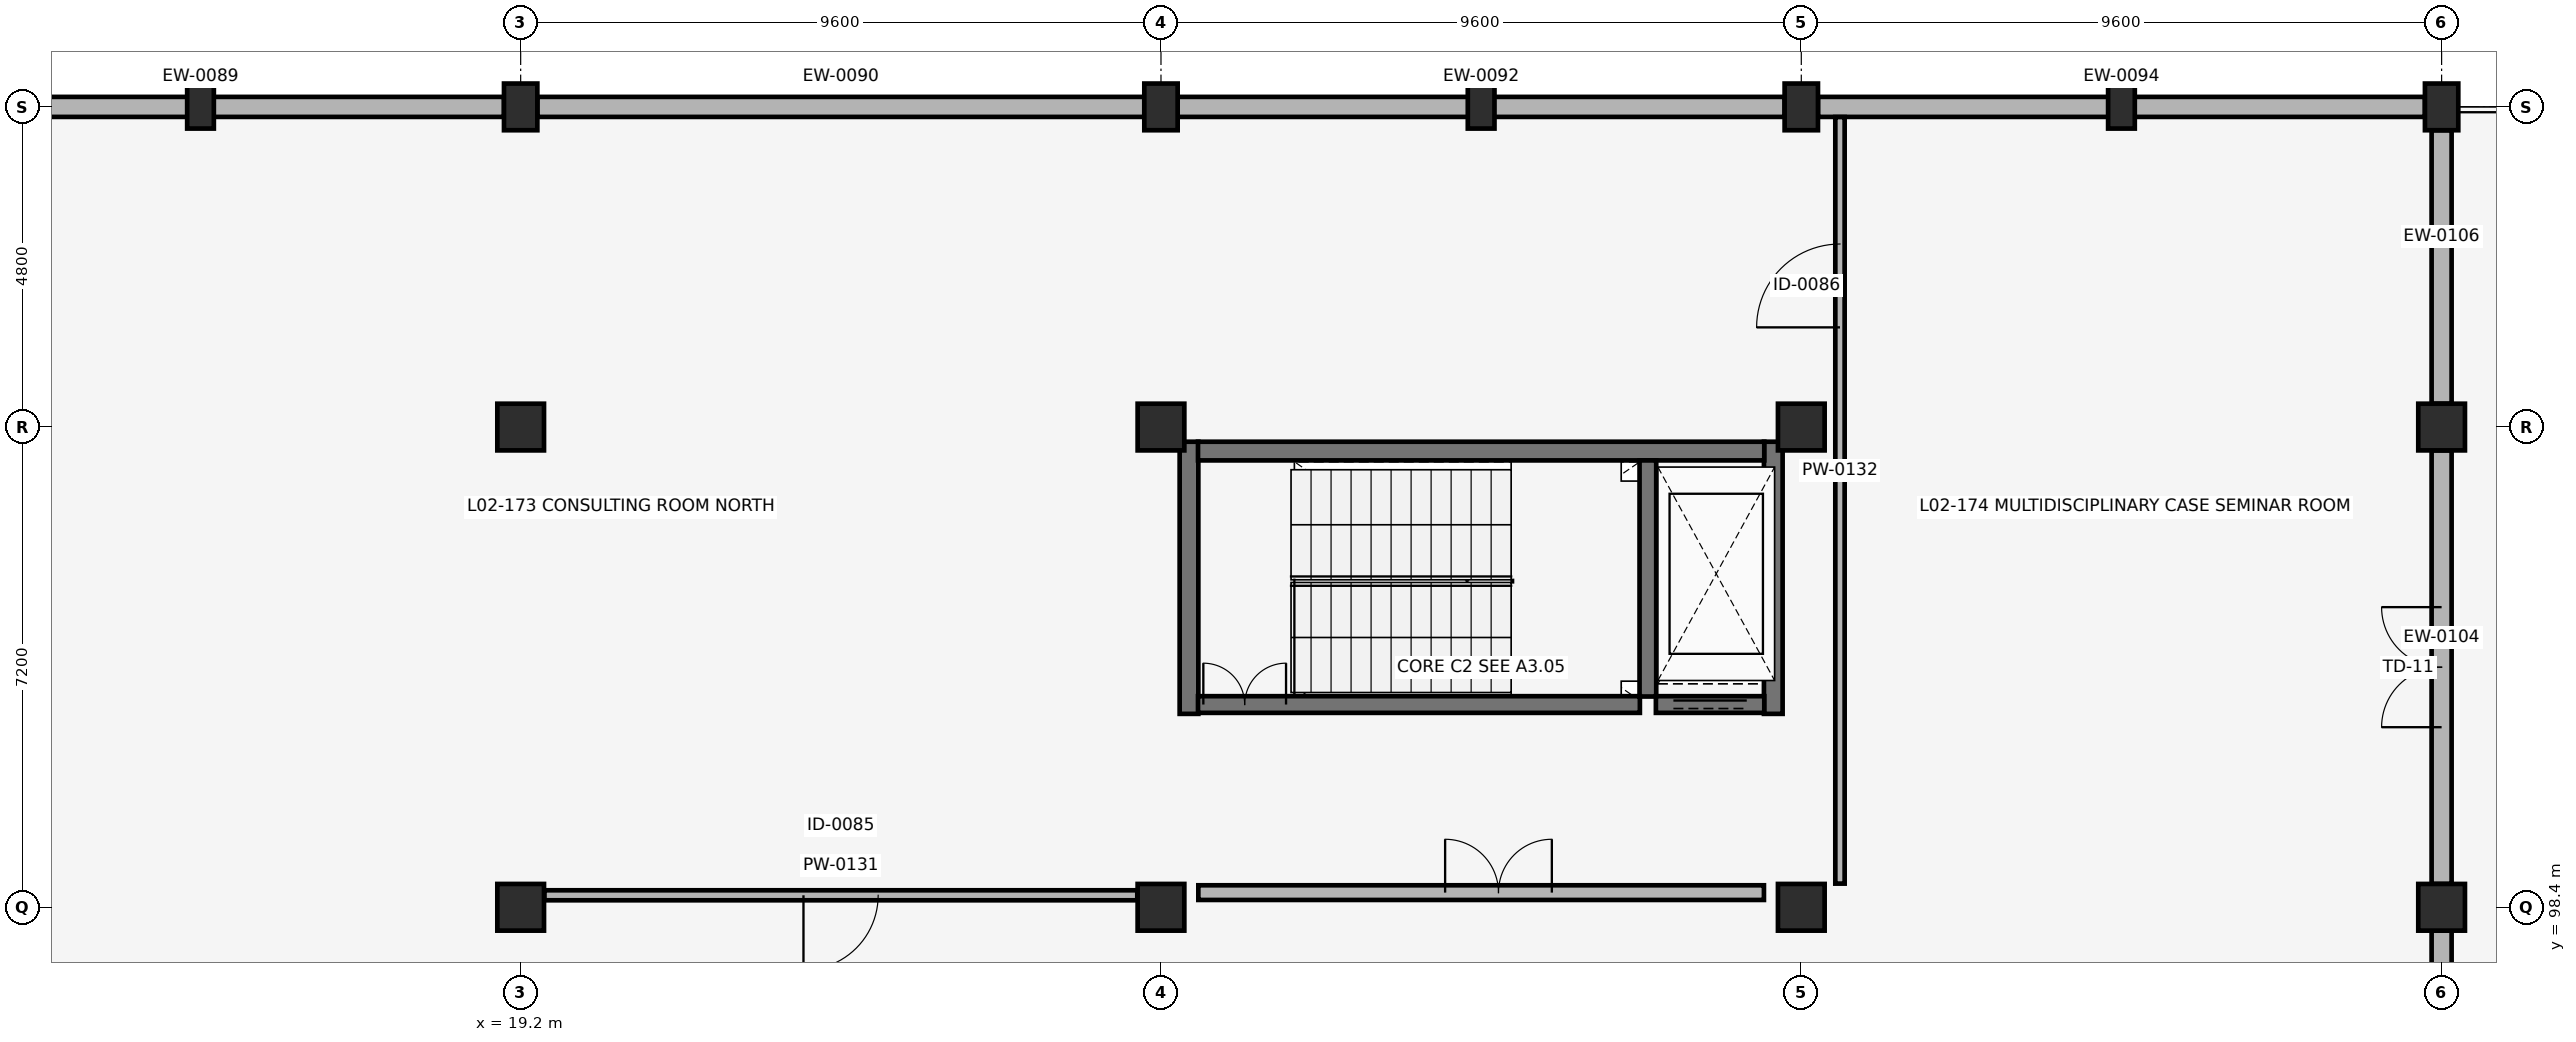
"""IFC4 building model, lengths in metres.
Left out: names, types, materials, properties, quantities, classifications, styles, units other than length and angle.
Written with IfcOpenShell. Run it as: python <this file> out.ifc"""

import sys

from ifc_helpers import new_model, si_unit, direction, frame, frame_2d, origin, origin_2d, place, context, subcontext, project, spatial, rectangle, extrude, element, fill, save


model = new_model("IFC4")
c1 = context("Model", 3, precision=1e-05, world=origin(), true_north=direction((0.0, 1.0)))
c2 = subcontext(c1, "Body", "Model", "MODEL_VIEW")
j1 = project(units=[si_unit("LENGTHUNIT", "METRE"), si_unit("PLANEANGLEUNIT", "RADIAN")], contexts=[c1])
p1 = place(None, origin())
s1 = spatial("IfcSite", under=j1, at=p1, CompositionType="ELEMENT")
p2 = place(p1, origin())
s2 = spatial("IfcBuilding", under=s1, at=p2, CompositionType="ELEMENT")
p3 = place(p2, frame((0.0, 0.0, 8.5)))
s3 = spatial("IfcBuildingStorey", under=s2, at=p3, CompositionType="ELEMENT", Elevation=8.5)
for number, where, z_axis, x_axis in (
    (1, (19.2, 98.4, 0.0), (0.0, 0.0, 1.0), (1.0, 0.0, 0.0)),
    (2, (19.2, 105.6, 0.0), (0.0, 0.0, 1.0), (1.0, 0.0, 0.0)),
):
    element("IfcColumn", number, at=place(p3, frame(where, z_axis=z_axis, x_axis=x_axis)), inside=s3, PredefinedType="COLUMN", context=c2, shape_type="SweptSolid", body=[
        extrude(rectangle(XDim=0.7, YDim=0.7, at=origin_2d()), origin(), (0.0, 0.0, 1.0), 4.08),
    ])
p4 = place(p3, frame((19.2, 110.4, 0.0), z_axis=(0.0, 0.0, 1.0), x_axis=(1.0, 0.0, 0.0)))
e3 = element("IfcColumn", 3, at=p4, inside=s3, PredefinedType="COLUMN", context=c2, shape_type="SweptSolid", body=[
    extrude(rectangle(XDim=0.5, YDim=0.7, at=origin_2d()), origin(), (0.0, 0.0, 1.0), 4.08),
])
for number, where, z_axis, x_axis in (
    (4, (28.8, 98.4, 0.0), (0.0, 0.0, 1.0), (1.0, 0.0, 0.0)),
    (5, (28.8, 105.6, 0.0), (0.0, 0.0, 1.0), (1.0, 0.0, 0.0)),
):
    element("IfcColumn", number, at=place(p3, frame(where, z_axis=z_axis, x_axis=x_axis)), inside=s3, PredefinedType="COLUMN", context=c2, shape_type="SweptSolid", body=[
        extrude(rectangle(XDim=0.7, YDim=0.7, at=origin_2d()), origin(), (0.0, 0.0, 1.0), 4.08),
    ])
p5 = place(p3, frame((28.8, 110.4, 0.0), z_axis=(0.0, 0.0, 1.0), x_axis=(1.0, 0.0, 0.0)))
e6 = element("IfcColumn", 6, at=p5, inside=s3, PredefinedType="COLUMN", context=c2, shape_type="SweptSolid", body=[
    extrude(rectangle(XDim=0.5, YDim=0.7, at=origin_2d()), origin(), (0.0, 0.0, 1.0), 4.08),
])
for number, where, z_axis, x_axis in (
    (7, (38.4, 98.4, 0.0), (0.0, 0.0, 1.0), (1.0, 0.0, 0.0)),
    (8, (38.4, 105.6, 0.0), (0.0, 0.0, 1.0), (1.0, 0.0, 0.0)),
):
    element("IfcColumn", number, at=place(p3, frame(where, z_axis=z_axis, x_axis=x_axis)), inside=s3, PredefinedType="COLUMN", context=c2, shape_type="SweptSolid", body=[
        extrude(rectangle(XDim=0.7, YDim=0.7, at=origin_2d()), origin(), (0.0, 0.0, 1.0), 4.08),
    ])
p6 = place(p3, frame((38.4, 110.4, 0.0), z_axis=(0.0, 0.0, 1.0), x_axis=(1.0, 0.0, 0.0)))
e9 = element("IfcColumn", 9, at=p6, inside=s3, PredefinedType="COLUMN", context=c2, shape_type="SweptSolid", body=[
    extrude(rectangle(XDim=0.5, YDim=0.7, at=origin_2d()), origin(), (0.0, 0.0, 1.0), 4.08),
])
for number, where, z_axis, x_axis in (
    (10, (48.0, 98.4, 0.0), (0.0, 0.0, 1.0), (1.0, 0.0, 0.0)),
    (11, (48.0, 105.6, 0.0), (0.0, 0.0, 1.0), (1.0, 0.0, 0.0)),
):
    element("IfcColumn", number, at=place(p3, frame(where, z_axis=z_axis, x_axis=x_axis)), inside=s3, PredefinedType="COLUMN", context=c2, shape_type="SweptSolid", body=[
        extrude(rectangle(XDim=0.7, YDim=0.7, at=origin_2d()), origin(), (0.0, 0.0, 1.0), 4.08),
    ])
p7 = place(p3, frame((48.0, 110.4, 0.0), z_axis=(0.0, 0.0, 1.0), x_axis=(1.0, 0.0, 0.0)))
e12 = element("IfcColumn", 12, at=p7, inside=s3, PredefinedType="COLUMN", context=c2, shape_type="SweptSolid", body=[
    extrude(rectangle(XDim=0.5, YDim=0.7, at=origin_2d()), origin(), (0.0, 0.0, 1.0), 4.08),
])
for number, where, z_axis, x_axis in (
    (13, (14.4, 110.4, 0.0), (0.0, 0.0, 1.0), (1.0, 0.0, 0.0)),
    (14, (33.6, 110.4, 0.0), (0.0, 0.0, 1.0), (1.0, 0.0, 0.0)),
    (15, (43.2, 110.4, 0.0), (0.0, 0.0, 1.0), (1.0, 0.0, 0.0)),
):
    element("IfcColumn", number, at=place(p3, frame(where, z_axis=z_axis, x_axis=x_axis)), inside=s3, PredefinedType="PILASTER", context=c2, shape_type="SweptSolid", body=[
        extrude(rectangle(XDim=0.4, YDim=0.65, at=origin_2d()), origin(), (0.0, 0.0, 1.0), 4.08),
    ])
p8 = place(p3, frame((18.95, 110.4, 0.0), z_axis=(0.0, 0.0, 1.0), x_axis=(-1.0, 0.0, 0.0)))
e16 = element("IfcWall", 16, at=p8, inside=s3, PredefinedType="SOLIDWALL", context=c2, shape_type="SweptSolid", body=[
    extrude(rectangle(XDim=9.1, YDim=0.3, at=frame_2d((4.55, 0.0))), origin(), (0.0, 0.0, 1.0), 3.08),
])
p9 = place(p3, frame((28.55, 110.4, 0.0), z_axis=(0.0, 0.0, 1.0), x_axis=(-1.0, 0.0, 0.0)))
e17 = element("IfcWall", 17, at=p9, inside=s3, PredefinedType="SOLIDWALL", context=c2, shape_type="SweptSolid", body=[
    extrude(rectangle(XDim=9.1, YDim=0.3, at=frame_2d((4.55, 0.0))), origin(), (0.0, 0.0, 1.0), 3.08),
])
p10 = place(p3, frame((38.15, 110.4, 0.0), z_axis=(0.0, 0.0, 1.0), x_axis=(-1.0, 0.0, 0.0)))
e18 = element("IfcWall", 18, at=p10, inside=s3, PredefinedType="SOLIDWALL", context=c2, shape_type="SweptSolid", body=[
    extrude(rectangle(XDim=9.1, YDim=0.3, at=frame_2d((4.55, 0.0))), origin(), (0.0, 0.0, 1.0), 3.08),
])
p11 = place(p3, frame((47.75, 110.4, 0.0), z_axis=(0.0, 0.0, 1.0), x_axis=(-1.0, 0.0, 0.0)))
e19 = element("IfcWall", 19, at=p11, inside=s3, PredefinedType="SOLIDWALL", context=c2, shape_type="SweptSolid", body=[
    extrude(rectangle(XDim=9.1, YDim=0.3, at=frame_2d((4.55, 0.0))), origin(), (0.0, 0.0, 1.0), 3.08),
])
p12 = place(p3, frame((48.0, 91.55, 0.0), z_axis=(0.0, 0.0, 1.0), x_axis=(0.0, 1.0, 0.0)))
e20 = element("IfcWall", 20, at=p12, inside=s3, PredefinedType="SOLIDWALL", context=c2, shape_type="SweptSolid", body=[
    extrude(rectangle(XDim=6.5, YDim=0.3, at=frame_2d((3.25, 0.0))), origin(), (0.0, 0.0, 1.0), 3.08),
])
p13 = place(p3, frame((48.0, 98.75, 0.0), z_axis=(0.0, 0.0, 1.0), x_axis=(0.0, 1.0, 0.0)))
e21 = element("IfcWall", 21, at=p13, inside=s3, PredefinedType="SOLIDWALL", context=c2, shape_type="SweptSolid", body=[
    extrude(rectangle(XDim=6.5, YDim=0.3, at=frame_2d((3.25, 0.0))), origin(), (0.0, 0.0, 1.0), 3.08),
])
p14 = place(p13, frame((2.35, 0.0, 0.0)))
e22 = element("IfcOpeningElement", 22, at=p14, cuts=e21, PredefinedType="OPENING", context=c2, shape_type="SweptSolid", body=[
    extrude(rectangle(XDim=1.8, YDim=2.2, at=frame_2d((0.9, 1.1))), frame((0.0, 0.16, 0.0), z_axis=(0.0, -1.0, 0.0), x_axis=(1.0, 0.0, 0.0)), (0.0, 0.0, 1.0), 0.32),
])
p15 = place(p3, frame((48.0, 105.95, 0.0), z_axis=(0.0, 0.0, 1.0), x_axis=(0.0, 1.0, 0.0)))
e23 = element("IfcWall", 23, at=p15, inside=s3, PredefinedType="SOLIDWALL", context=c2, shape_type="SweptSolid", body=[
    extrude(rectangle(XDim=4.1, YDim=0.3, at=frame_2d((2.05, 0.0))), origin(), (0.0, 0.0, 1.0), 3.08),
])
for number, where, z_axis, x_axis in (
    (24, (29.22, 101.3, 0.0), (0.0, 0.0, 1.0), (0.0, 1.0, 0.0)),
    (25, (37.98, 101.3, 0.0), (0.0, 0.0, 1.0), (0.0, 1.0, 0.0)),
):
    element("IfcWall", number, at=place(p3, frame(where, z_axis=z_axis, x_axis=x_axis)), inside=s3, PredefinedType="SHEAR", context=c2, shape_type="SweptSolid", body=[
        extrude(rectangle(XDim=4.08, YDim=0.28, at=frame_2d((2.04, 0.0))), origin(), (0.0, 0.0, 1.0), 3.8),
    ])
p16 = place(p3, frame((29.355, 105.24, 0.0), z_axis=(0.0, 0.0, 1.0), x_axis=(1.0, 0.0, 0.0)))
e26 = element("IfcWall", 26, at=p16, inside=s3, PredefinedType="SHEAR", context=c2, shape_type="SweptSolid", body=[
    extrude(rectangle(XDim=8.49, YDim=0.28, at=frame_2d((4.245, 0.0))), origin(), (0.0, 0.0, 1.0), 3.8),
])
p17 = place(p3, frame((36.1, 101.56, 0.0), z_axis=(0.0, 0.0, 1.0), x_axis=(0.0, 1.0, 0.0)))
e27 = element("IfcWall", 27, at=p17, inside=s3, PredefinedType="SHEAR", context=c2, shape_type="SweptSolid", body=[
    extrude(rectangle(XDim=3.54, YDim=0.25, at=frame_2d((1.77, 0.0))), origin(), (0.0, 0.0, 1.0), 3.8),
])
p18 = place(p3, frame((29.355, 101.44, 0.0), z_axis=(0.0, 0.0, 1.0), x_axis=(1.0, 0.0, 0.0)))
e28 = element("IfcWall", 28, at=p18, inside=s3, PredefinedType="SHEAR", context=c2, shape_type="SweptSolid", body=[
    extrude(rectangle(XDim=6.625, YDim=0.25, at=frame_2d((3.312, 0.0))), origin(), (0.0, 0.0, 1.0), 3.8),
])
p19 = place(p18, frame((0.08, 0.0, 0.0)))
e29 = element("IfcOpeningElement", 29, at=p19, cuts=e28, PredefinedType="OPENING", context=c2, shape_type="SweptSolid", body=[
    extrude(rectangle(XDim=1.24, YDim=2.15, at=frame_2d((0.62, 1.075))), frame((0.0, 0.135, 0.0), z_axis=(0.0, -1.0, 0.0), x_axis=(1.0, 0.0, 0.0)), (0.0, 0.0, 1.0), 0.27),
])
p20 = place(p3, frame((29.36, 98.62, 0.0), z_axis=(0.0, 0.0, 1.0), x_axis=(1.0, 0.0, 0.0)))
e30 = element("IfcWall", 30, at=p20, inside=s3, PredefinedType="PARTITIONING", context=c2, shape_type="SweptSolid", body=[
    extrude(rectangle(XDim=8.48, YDim=0.22, at=frame_2d((4.24, 0.0))), origin(), (0.0, 0.0, 1.0), 3.13),
])
p21 = place(p20, frame((3.7, 0.0, 0.0)))
e31 = element("IfcOpeningElement", 31, at=p21, cuts=e30, PredefinedType="OPENING", context=c2, shape_type="SweptSolid", body=[
    extrude(rectangle(XDim=1.6, YDim=2.2, at=frame_2d((0.8, 1.1))), frame((0.0, 0.12, 0.0), z_axis=(0.0, -1.0, 0.0), x_axis=(1.0, 0.0, 0.0)), (0.0, 0.0, 1.0), 0.24),
])
p22 = place(p3, frame((36.22, 101.44, 0.0), z_axis=(0.0, 0.0, 1.0), x_axis=(1.0, 0.0, 0.0)))
e32 = element("IfcWall", 32, at=p22, inside=s3, PredefinedType="SHEAR", context=c2, shape_type="SweptSolid", body=[
    extrude(rectangle(XDim=1.625, YDim=0.25, at=frame_2d((0.812, 0.0))), origin(), (0.0, 0.0, 1.0), 3.8),
])
p23 = place(p22, frame((0.262, 0.0, 0.0)))
e33 = element("IfcOpeningElement", 33, at=p23, cuts=e32, PredefinedType="OPENING", context=c2, shape_type="SweptSolid", body=[
    extrude(rectangle(XDim=1.1, YDim=2.15, at=frame_2d((0.55, 1.075))), frame((0.0, 0.135, 0.0), z_axis=(0.0, -1.0, 0.0), x_axis=(1.0, 0.0, 0.0)), (0.0, 0.0, 1.0), 0.27),
])
p24 = place(p3, frame((19.555, 98.58, 0.0), z_axis=(0.0, 0.0, 1.0), x_axis=(1.0, 0.0, 0.0)))
e34 = element("IfcWall", 34, at=p24, inside=s3, PredefinedType="PARTITIONING", context=c2, shape_type="SweptSolid", body=[
    extrude(rectangle(XDim=8.89, YDim=0.15, at=frame_2d((4.445, 0.0))), origin(), (0.0, 0.0, 1.0), 3.12),
])
p25 = place(p24, frame((3.885, 0.0, 0.0)))
e35 = element("IfcOpeningElement", 35, at=p25, cuts=e34, PredefinedType="OPENING", context=c2, shape_type="SweptSolid", body=[
    extrude(rectangle(XDim=1.12, YDim=2.1, at=frame_2d((0.56, 1.05))), frame((0.0, 0.085, 0.0), z_axis=(0.0, -1.0, 0.0), x_axis=(1.0, 0.0, 0.0)), (0.0, 0.0, 1.0), 0.17),
])
p26 = place(p3, frame((38.98, 98.755, 0.0), z_axis=(0.0, 0.0, 1.0), x_axis=(0.0, 1.0, 0.0)))
e36 = element("IfcWall", 36, at=p26, inside=s3, PredefinedType="PARTITIONING", context=c2, shape_type="SweptSolid", body=[
    extrude(rectangle(XDim=11.493, YDim=0.14, at=frame_2d((5.747, 0.0))), origin(), (0.0, 0.0, 1.0), 3.08),
])
p27 = place(p26, frame((8.34, 0.0, 0.0)))
e37 = element("IfcOpeningElement", 37, at=p27, cuts=e36, PredefinedType="OPENING", context=c2, shape_type="SweptSolid", body=[
    extrude(rectangle(XDim=1.25, YDim=2.12, at=frame_2d((0.625, 1.06))), frame((0.0, 0.08, 0.0), z_axis=(0.0, -1.0, 0.0), x_axis=(1.0, 0.0, 0.0)), (0.0, 0.0, 1.0), 0.16),
])
p28 = place(p14, origin())
e38 = element("IfcDoor", 38, at=p28, inside=s3, OperationType="DOUBLE_DOOR_SINGLE_SWING", PredefinedType="DOOR", context=c2, shape_type="SweptSolid", body=[
    extrude(rectangle(XDim=1.8, YDim=2.2, at=frame_2d((0.9, 1.1))), frame((0.0, 0.025, 0.0), z_axis=(0.0, -1.0, 0.0), x_axis=(1.0, 0.0, 0.0)), (0.0, 0.0, 1.0), 0.05),
])
fill(e22, e38)
p29 = place(p19, origin())
e39 = element("IfcDoor", 39, at=p29, inside=s3, OperationType="DOUBLE_DOOR_SINGLE_SWING", PredefinedType="DOOR", context=c2, shape_type="SweptSolid", body=[
    extrude(rectangle(XDim=1.24, YDim=2.15, at=frame_2d((0.62, 1.075))), frame((0.0, 0.025, 0.0), z_axis=(0.0, -1.0, 0.0), x_axis=(1.0, 0.0, 0.0)), (0.0, 0.0, 1.0), 0.05),
])
fill(e29, e39)
p30 = place(p21, origin())
e40 = element("IfcDoor", 40, at=p30, inside=s3, OperationType="DOUBLE_DOOR_SINGLE_SWING", PredefinedType="DOOR", context=c2, shape_type="SweptSolid", body=[
    extrude(rectangle(XDim=1.6, YDim=2.2, at=frame_2d((0.8, 1.1))), frame((0.0, 0.025, 0.0), z_axis=(0.0, -1.0, 0.0), x_axis=(1.0, 0.0, 0.0)), (0.0, 0.0, 1.0), 0.05),
])
fill(e31, e40)
p31 = place(p23, origin())
e41 = element("IfcDoor", 41, at=p31, inside=s3, OperationType="DOUBLE_DOOR_SLIDING", PredefinedType="DOOR", context=c2, shape_type="SweptSolid", body=[
    extrude(rectangle(XDim=1.1, YDim=2.15, at=frame_2d((0.55, 1.075))), frame((0.0, 0.025, 0.0), z_axis=(0.0, -1.0, 0.0), x_axis=(1.0, 0.0, 0.0)), (0.0, 0.0, 1.0), 0.05),
])
fill(e33, e41)
p32 = place(p25, origin())
e42 = element("IfcDoor", 42, at=p32, inside=s3, OperationType="SINGLE_SWING_RIGHT", PredefinedType="DOOR", context=c2, shape_type="SweptSolid", body=[
    extrude(rectangle(XDim=1.12, YDim=2.1, at=frame_2d((0.56, 1.05))), frame((0.0, 0.025, 0.0), z_axis=(0.0, -1.0, 0.0), x_axis=(1.0, 0.0, 0.0)), (0.0, 0.0, 1.0), 0.05),
])
fill(e35, e42)
p33 = place(p27, origin())
e43 = element("IfcDoor", 43, at=p33, inside=s3, OperationType="SINGLE_SWING_LEFT", PredefinedType="DOOR", context=c2, shape_type="SweptSolid", body=[
    extrude(rectangle(XDim=1.25, YDim=2.12, at=frame_2d((0.625, 1.06))), frame((0.0, 0.025, 0.0), z_axis=(0.0, -1.0, 0.0), x_axis=(1.0, 0.0, 0.0)), (0.0, 0.0, 1.0), 0.05),
])
fill(e37, e43)
save(model, sys.argv[1])
